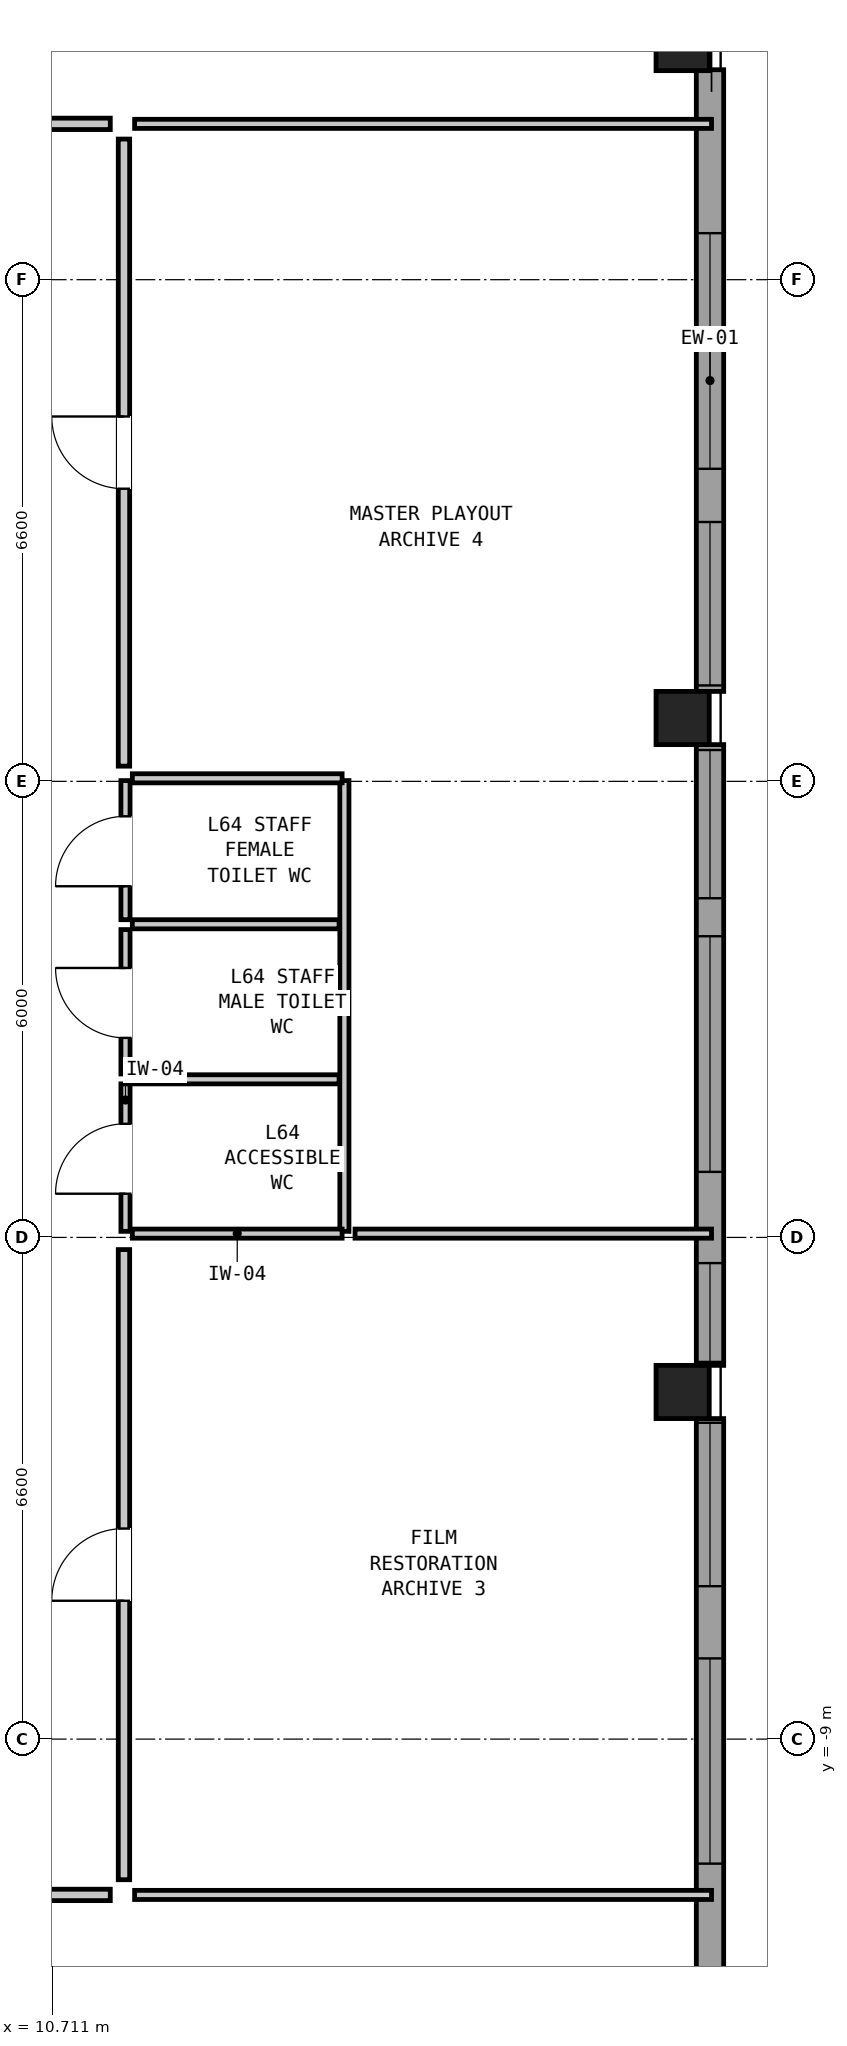
"""IFC4 building model, lengths in metres.
Left out: names, types, materials, properties, quantities, classifications, styles, units other than length and angle.
Written with IfcOpenShell. Run it as: python <this file> out.ifc"""

import sys

from ifc_helpers import new_model, si_unit, direction, frame, frame_2d, origin, origin_2d, place, context, subcontext, project, spatial, rectangle, hollow_rectangle, extrude, element, fill, save


model = new_model("IFC4")
c1 = context("Model", 3, precision=1e-05, world=origin(), true_north=direction((0.0, 1.0)))
c2 = subcontext(c1, "Body", "Model", "MODEL_VIEW")
j1 = project(units=[si_unit("LENGTHUNIT", "METRE"), si_unit("PLANEANGLEUNIT", "RADIAN")], contexts=[c1])
p1 = place(None, origin())
s1 = spatial("IfcSite", under=j1, at=p1, CompositionType="ELEMENT")
p2 = place(p1, origin())
s2 = spatial("IfcBuilding", under=s1, at=p2, CompositionType="ELEMENT")
p3 = place(p2, frame((0.0, 0.0, 217.8)))
s3 = spatial("IfcBuildingStorey", under=s2, at=p3, CompositionType="ELEMENT", Elevation=217.8)
for number, where, z_axis, x_axis in (
    (1, (19.0, -4.433, 0.0), (0.0, 0.0, 1.0), (0.0, 1.0, 0.0)),
    (2, (19.0, 4.433, 0.0), (0.0, 0.0, 1.0), (0.0, 1.0, 0.0)),
    (3, (19.0, 13.3, 0.0), (0.0, 0.0, 1.0), (0.0, 1.0, 0.0)),
):
    element("IfcColumn", number, at=place(p3, frame(where, z_axis=z_axis, x_axis=x_axis)), inside=s3, PredefinedType="COLUMN", context=c2, shape_type="SweptSolid", body=[
        extrude(hollow_rectangle(XDim=0.7, YDim=0.7, WallThickness=0.045, at=origin_2d()), origin(), (0.0, 0.0, 1.0), 3.05),
    ])
p4 = place(p3, frame((19.36, 12.962, 0.0), z_axis=(0.0, 0.0, 1.0), x_axis=(0.0, -1.0, 0.0)))
e4 = element("IfcWall", 4, at=p4, inside=s3, PredefinedType="SOLIDWALL", context=c2, shape_type="SweptSolid", body=[
    extrude(rectangle(XDim=8.179, YDim=0.36, at=frame_2d((4.089, 0.0))), origin(), (0.0, 0.0, 1.0), 2.374),
])
p5 = place(p4, frame((2.15, 0.0, 1.4)))
e5 = element("IfcOpeningElement", 5, at=p5, cuts=e4, PredefinedType="OPENING", context=c2, shape_type="SweptSolid", body=[
    extrude(rectangle(XDim=3.1, YDim=0.8, at=frame_2d((1.55, 0.4))), frame((0.0, 0.192, 0.0), z_axis=(0.0, -1.0, 0.0), x_axis=(1.0, 0.0, 0.0)), (0.0, 0.0, 1.0), 0.384),
])
p6 = place(p4, frame((5.95, 0.0, 0.2)))
e6 = element("IfcOpeningElement", 6, at=p6, cuts=e4, PredefinedType="OPENING", context=c2, shape_type="SweptSolid", body=[
    extrude(rectangle(XDim=2.15, YDim=1.05, at=frame_2d((1.075, 0.525))), frame((0.0, 0.192, 0.0), z_axis=(0.0, -1.0, 0.0), x_axis=(1.0, 0.0, 0.0)), (0.0, 0.0, 1.0), 0.384),
])
p7 = place(p3, frame((19.36, 4.083, 0.0), z_axis=(0.0, 0.0, 1.0), x_axis=(0.0, -1.0, 0.0)))
e7 = element("IfcWall", 7, at=p7, inside=s3, PredefinedType="SOLIDWALL", context=c2, shape_type="SweptSolid", body=[
    extrude(rectangle(XDim=8.167, YDim=0.36, at=frame_2d((4.083, 0.0))), origin(), (0.0, 0.0, 1.0), 2.374),
])
p8 = place(p7, frame((0.071, 0.0, 0.2)))
e8 = element("IfcOpeningElement", 8, at=p8, cuts=e7, PredefinedType="OPENING", context=c2, shape_type="SweptSolid", body=[
    extrude(rectangle(XDim=1.95, YDim=0.95, at=frame_2d((0.975, 0.475))), frame((0.0, 0.192, 0.0), z_axis=(0.0, -1.0, 0.0), x_axis=(1.0, 0.0, 0.0)), (0.0, 0.0, 1.0), 0.384),
])
p9 = place(p7, frame((2.521, 0.0, 1.4)))
e9 = element("IfcOpeningElement", 9, at=p9, cuts=e7, PredefinedType="OPENING", context=c2, shape_type="SweptSolid", body=[
    extrude(rectangle(XDim=3.1, YDim=0.8, at=frame_2d((1.55, 0.4))), frame((0.0, 0.192, 0.0), z_axis=(0.0, -1.0, 0.0), x_axis=(1.0, 0.0, 0.0)), (0.0, 0.0, 1.0), 0.384),
])
p10 = place(p7, frame((6.821, 0.0, 0.2)))
e10 = element("IfcOpeningElement", 10, at=p10, cuts=e7, PredefinedType="OPENING", context=c2, shape_type="SweptSolid", body=[
    extrude(rectangle(XDim=1.3, YDim=1.3, at=frame_2d((0.65, 0.65))), frame((0.0, 0.192, 0.0), z_axis=(0.0, -1.0, 0.0), x_axis=(1.0, 0.0, 0.0)), (0.0, 0.0, 1.0), 0.384),
])
p11 = place(p3, frame((19.36, -4.783, 0.0), z_axis=(0.0, 0.0, 1.0), x_axis=(0.0, -1.0, 0.0)))
e11 = element("IfcWall", 11, at=p11, inside=s3, PredefinedType="SOLIDWALL", context=c2, shape_type="SweptSolid", body=[
    extrude(rectangle(XDim=8.179, YDim=0.36, at=frame_2d((4.089, 0.0))), origin(), (0.0, 0.0, 1.0), 2.374),
])
p12 = place(p11, frame((0.055, 0.0, 0.2)))
e12 = element("IfcOpeningElement", 12, at=p12, cuts=e11, PredefinedType="OPENING", context=c2, shape_type="SweptSolid", body=[
    extrude(rectangle(XDim=2.15, YDim=1.05, at=frame_2d((1.075, 0.525))), frame((0.0, 0.192, 0.0), z_axis=(0.0, -1.0, 0.0), x_axis=(1.0, 0.0, 0.0)), (0.0, 0.0, 1.0), 0.384),
])
p13 = place(p11, frame((3.155, 0.0, 1.3)))
e13 = element("IfcOpeningElement", 13, at=p13, cuts=e11, PredefinedType="OPENING", context=c2, shape_type="SweptSolid", body=[
    extrude(rectangle(XDim=2.7, YDim=0.9, at=frame_2d((1.35, 0.45))), frame((0.0, 0.192, 0.0), z_axis=(0.0, -1.0, 0.0), x_axis=(1.0, 0.0, 0.0)), (0.0, 0.0, 1.0), 0.384),
])
p14 = place(p3, frame((11.67, -2.32, 0.0), z_axis=(0.0, 0.0, 1.0), x_axis=(0.0, 1.0, 0.0)))
e14 = element("IfcWall", 14, at=p14, inside=s3, PredefinedType="PARTITIONING", context=c2, shape_type="SweptSolid", body=[
    extrude(rectangle(XDim=1.94, YDim=0.12, at=frame_2d((0.97, 0.0))), origin(), (0.0, 0.0, 1.0), 2.86),
])
p15 = place(p14, frame((0.495, 0.0, 0.0)))
e15 = element("IfcOpeningElement", 15, at=p15, cuts=e14, PredefinedType="OPENING", context=c2, shape_type="SweptSolid", body=[
    extrude(rectangle(XDim=0.92, YDim=2.1, at=frame_2d((0.46, 1.05))), frame((0.0, 0.072, 0.0), z_axis=(0.0, -1.0, 0.0), x_axis=(1.0, 0.0, 0.0)), (0.0, 0.0, 1.0), 0.144),
])
p16 = place(p3, frame((11.67, -0.25, 0.0), z_axis=(0.0, 0.0, 1.0), x_axis=(0.0, 1.0, 0.0)))
e16 = element("IfcWall", 16, at=p16, inside=s3, PredefinedType="PARTITIONING", context=c2, shape_type="SweptSolid", body=[
    extrude(rectangle(XDim=1.9, YDim=0.12, at=frame_2d((0.95, 0.0))), origin(), (0.0, 0.0, 1.0), 2.86),
])
p17 = place(p16, frame((0.475, 0.0, 0.0)))
e17 = element("IfcOpeningElement", 17, at=p17, cuts=e16, PredefinedType="OPENING", context=c2, shape_type="SweptSolid", body=[
    extrude(rectangle(XDim=0.92, YDim=2.1, at=frame_2d((0.46, 1.05))), frame((0.0, 0.072, 0.0), z_axis=(0.0, -1.0, 0.0), x_axis=(1.0, 0.0, 0.0)), (0.0, 0.0, 1.0), 0.144),
])
p18 = place(p3, frame((11.67, 1.78, 0.0), z_axis=(0.0, 0.0, 1.0), x_axis=(0.0, 1.0, 0.0)))
e18 = element("IfcWall", 18, at=p18, inside=s3, PredefinedType="PARTITIONING", context=c2, shape_type="SweptSolid", body=[
    extrude(rectangle(XDim=1.83, YDim=0.12, at=frame_2d((0.915, 0.0))), origin(), (0.0, 0.0, 1.0), 2.86),
])
p19 = place(p18, frame((0.44, 0.0, 0.0)))
e19 = element("IfcOpeningElement", 19, at=p19, cuts=e18, PredefinedType="OPENING", context=c2, shape_type="SweptSolid", body=[
    extrude(rectangle(XDim=0.92, YDim=2.1, at=frame_2d((0.46, 1.05))), frame((0.0, 0.072, 0.0), z_axis=(0.0, -1.0, 0.0), x_axis=(1.0, 0.0, 0.0)), (0.0, 0.0, 1.0), 0.144),
])
p20 = place(p3, frame((14.55, -2.32, 0.0), z_axis=(0.0, 0.0, 1.0), x_axis=(0.0, 1.0, 0.0)))
e20 = element("IfcWall", 20, at=p20, inside=s3, PredefinedType="PARTITIONING", context=c2, shape_type="SweptSolid", body=[
    extrude(rectangle(XDim=5.93, YDim=0.12, at=frame_2d((2.965, 0.0))), origin(), (0.0, 0.0, 1.0), 2.86),
])
for number, where, z_axis, x_axis in (
    (21, (11.76, -2.35, 0.0), (0.0, 0.0, 1.0), (1.0, 0.0, 0.0)),
    (22, (11.76, 3.64, 0.0), (0.0, 0.0, 1.0), (1.0, 0.0, 0.0)),
):
    element("IfcWall", number, at=place(p3, frame(where, z_axis=z_axis, x_axis=x_axis)), inside=s3, PredefinedType="PARTITIONING", context=c2, shape_type="SweptSolid", body=[
        extrude(rectangle(XDim=2.76, YDim=0.12, at=frame_2d((1.38, 0.0))), origin(), (0.0, 0.0, 1.0), 1.981),
    ])
for number, where, z_axis, x_axis in (
    (23, (11.76, -0.32, 0.0), (0.0, 0.0, 1.0), (1.0, 0.0, 0.0)),
    (24, (11.76, 1.72, 0.0), (0.0, 0.0, 1.0), (1.0, 0.0, 0.0)),
):
    element("IfcWall", number, at=place(p3, frame(where, z_axis=z_axis, x_axis=x_axis)), inside=s3, PredefinedType="PARTITIONING", context=c2, shape_type="SweptSolid", body=[
        extrude(rectangle(XDim=2.72, YDim=0.12, at=frame_2d((1.36, 0.0))), origin(), (0.0, 0.0, 1.0), 2.86),
    ])
for number, where, z_axis, x_axis in (
    (25, (11.79, 12.25, 0.0), (0.0, 0.0, 1.0), (1.0, 0.0, 0.0)),
    (26, (11.79, -11.05, 0.0), (0.0, 0.0, 1.0), (1.0, 0.0, 0.0)),
):
    element("IfcWall", number, at=place(p3, frame(where, z_axis=z_axis, x_axis=x_axis)), inside=s3, PredefinedType="PARTITIONING", context=c2, shape_type="SweptSolid", body=[
        extrude(rectangle(XDim=7.59, YDim=0.12, at=frame_2d((3.795, 0.0))), origin(), (0.0, 0.0, 1.0), 2.86),
    ])
p21 = place(p3, frame((14.69, -2.35, 0.0), z_axis=(0.0, 0.0, 1.0), x_axis=(1.0, 0.0, 0.0)))
e27 = element("IfcWall", 27, at=p21, inside=s3, PredefinedType="PARTITIONING", context=c2, shape_type="SweptSolid", body=[
    extrude(rectangle(XDim=4.69, YDim=0.12, at=frame_2d((2.345, 0.0))), origin(), (0.0, 0.0, 1.0), 1.981),
])
p22 = place(p3, frame((6.68, 12.25, 0.0), z_axis=(0.0, 0.0, 1.0), x_axis=(1.0, 0.0, 0.0)))
e28 = element("IfcWall", 28, at=p22, inside=s3, PredefinedType="PARTITIONING", context=c2, shape_type="SweptSolid", body=[
    extrude(rectangle(XDim=4.79, YDim=0.15, at=frame_2d((2.395, 0.0))), origin(), (0.0, 0.0, 1.0), 2.86),
])
p23 = place(p22, frame((1.32, 0.0, 0.0)))
e29 = element("IfcOpeningElement", 29, at=p23, cuts=e28, PredefinedType="OPENING", context=c2, shape_type="SweptSolid", body=[
    extrude(rectangle(XDim=0.95, YDim=2.1, at=frame_2d((0.475, 1.05))), frame((0.0, 0.087, 0.0), z_axis=(0.0, -1.0, 0.0), x_axis=(1.0, 0.0, 0.0)), (0.0, 0.0, 1.0), 0.174),
])
p24 = place(p3, frame((7.68, -11.05, 0.0), z_axis=(0.0, 0.0, 1.0), x_axis=(1.0, 0.0, 0.0)))
e30 = element("IfcWall", 30, at=p24, inside=s3, PredefinedType="PARTITIONING", context=c2, shape_type="SweptSolid", body=[
    extrude(rectangle(XDim=3.79, YDim=0.15, at=frame_2d((1.895, 0.0))), origin(), (0.0, 0.0, 1.0), 2.86),
])
p25 = place(p24, frame((2.02, 0.0, 0.0)))
e31 = element("IfcOpeningElement", 31, at=p25, cuts=e30, PredefinedType="OPENING", context=c2, shape_type="SweptSolid", body=[
    extrude(rectangle(XDim=0.95, YDim=2.1, at=frame_2d((0.475, 1.05))), frame((0.0, 0.087, 0.0), z_axis=(0.0, -1.0, 0.0), x_axis=(1.0, 0.0, 0.0)), (0.0, 0.0, 1.0), 0.174),
])
p26 = place(p3, frame((11.65, -10.85, 0.0), z_axis=(0.0, 0.0, 1.0), x_axis=(0.0, 1.0, 0.0)))
e32 = element("IfcWall", 32, at=p26, inside=s3, PredefinedType="PARTITIONING", context=c2, shape_type="SweptSolid", body=[
    extrude(rectangle(XDim=8.29, YDim=0.15, at=frame_2d((4.145, 0.0))), origin(), (0.0, 0.0, 1.0), 2.86),
])
p27 = place(p26, frame((3.67, 0.0, 0.0)))
e33 = element("IfcOpeningElement", 33, at=p27, cuts=e32, PredefinedType="OPENING", context=c2, shape_type="SweptSolid", body=[
    extrude(rectangle(XDim=0.95, YDim=2.1, at=frame_2d((0.475, 1.05))), frame((0.0, 0.087, 0.0), z_axis=(0.0, -1.0, 0.0), x_axis=(1.0, 0.0, 0.0)), (0.0, 0.0, 1.0), 0.174),
])
p28 = place(p3, frame((11.65, 3.8, 0.0), z_axis=(0.0, 0.0, 1.0), x_axis=(0.0, 1.0, 0.0)))
e34 = element("IfcWall", 34, at=p28, inside=s3, PredefinedType="PARTITIONING", context=c2, shape_type="SweptSolid", body=[
    extrude(rectangle(XDim=8.25, YDim=0.15, at=frame_2d((4.125, 0.0))), origin(), (0.0, 0.0, 1.0), 2.86),
])
p29 = place(p28, frame((3.65, 0.0, 0.0)))
e35 = element("IfcOpeningElement", 35, at=p29, cuts=e34, PredefinedType="OPENING", context=c2, shape_type="SweptSolid", body=[
    extrude(rectangle(XDim=0.95, YDim=2.1, at=frame_2d((0.475, 1.05))), frame((0.0, 0.087, 0.0), z_axis=(0.0, -1.0, 0.0), x_axis=(1.0, 0.0, 0.0)), (0.0, 0.0, 1.0), 0.174),
])
p30 = place(p5, origin())
e36 = element("IfcWindow", 36, at=p30, inside=s3, PartitioningType="SINGLE_PANEL", PredefinedType="WINDOW", context=c2, shape_type="SweptSolid", body=[
    extrude(rectangle(XDim=3.1, YDim=0.8, at=frame_2d((1.55, 0.4))), frame((0.0, 0.03, 0.0), z_axis=(0.0, -1.0, 0.0), x_axis=(1.0, 0.0, 0.0)), (0.0, 0.0, 1.0), 0.06),
])
fill(e5, e36)
p31 = place(p6, origin())
e37 = element("IfcWindow", 37, at=p31, inside=s3, PartitioningType="SINGLE_PANEL", PredefinedType="WINDOW", context=c2, shape_type="SweptSolid", body=[
    extrude(rectangle(XDim=2.15, YDim=1.05, at=frame_2d((1.075, 0.525))), frame((0.0, 0.03, 0.0), z_axis=(0.0, -1.0, 0.0), x_axis=(1.0, 0.0, 0.0)), (0.0, 0.0, 1.0), 0.06),
])
fill(e6, e37)
p32 = place(p8, origin())
e38 = element("IfcWindow", 38, at=p32, inside=s3, PartitioningType="SINGLE_PANEL", PredefinedType="WINDOW", context=c2, shape_type="SweptSolid", body=[
    extrude(rectangle(XDim=1.95, YDim=0.95, at=frame_2d((0.975, 0.475))), frame((0.0, 0.03, 0.0), z_axis=(0.0, -1.0, 0.0), x_axis=(1.0, 0.0, 0.0)), (0.0, 0.0, 1.0), 0.06),
])
fill(e8, e38)
p33 = place(p9, origin())
e39 = element("IfcWindow", 39, at=p33, inside=s3, PartitioningType="SINGLE_PANEL", PredefinedType="WINDOW", context=c2, shape_type="SweptSolid", body=[
    extrude(rectangle(XDim=3.1, YDim=0.8, at=frame_2d((1.55, 0.4))), frame((0.0, 0.03, 0.0), z_axis=(0.0, -1.0, 0.0), x_axis=(1.0, 0.0, 0.0)), (0.0, 0.0, 1.0), 0.06),
])
fill(e9, e39)
p34 = place(p10, origin())
e40 = element("IfcWindow", 40, at=p34, inside=s3, PartitioningType="SINGLE_PANEL", PredefinedType="WINDOW", context=c2, shape_type="SweptSolid", body=[
    extrude(rectangle(XDim=1.3, YDim=1.3, at=frame_2d((0.65, 0.65))), frame((0.0, 0.03, 0.0), z_axis=(0.0, -1.0, 0.0), x_axis=(1.0, 0.0, 0.0)), (0.0, 0.0, 1.0), 0.06),
])
fill(e10, e40)
p35 = place(p12, origin())
e41 = element("IfcWindow", 41, at=p35, inside=s3, PartitioningType="SINGLE_PANEL", PredefinedType="WINDOW", context=c2, shape_type="SweptSolid", body=[
    extrude(rectangle(XDim=2.15, YDim=1.05, at=frame_2d((1.075, 0.525))), frame((0.0, 0.03, 0.0), z_axis=(0.0, -1.0, 0.0), x_axis=(1.0, 0.0, 0.0)), (0.0, 0.0, 1.0), 0.06),
])
fill(e12, e41)
p36 = place(p13, origin())
e42 = element("IfcWindow", 42, at=p36, inside=s3, PartitioningType="SINGLE_PANEL", PredefinedType="WINDOW", context=c2, shape_type="SweptSolid", body=[
    extrude(rectangle(XDim=2.7, YDim=0.9, at=frame_2d((1.35, 0.45))), frame((0.0, 0.03, 0.0), z_axis=(0.0, -1.0, 0.0), x_axis=(1.0, 0.0, 0.0)), (0.0, 0.0, 1.0), 0.06),
])
fill(e13, e42)
p37 = place(p15, origin())
e43 = element("IfcDoor", 43, at=p37, inside=s3, OperationType="SINGLE_SWING_LEFT", PredefinedType="DOOR", context=c2, shape_type="SweptSolid", body=[
    extrude(rectangle(XDim=0.92, YDim=2.1, at=frame_2d((0.46, 1.05))), frame((0.0, 0.025, 0.0), z_axis=(0.0, -1.0, 0.0), x_axis=(1.0, 0.0, 0.0)), (0.0, 0.0, 1.0), 0.05),
])
fill(e15, e43)
p38 = place(p17, origin())
e44 = element("IfcDoor", 44, at=p38, inside=s3, OperationType="SINGLE_SWING_RIGHT", PredefinedType="DOOR", context=c2, shape_type="SweptSolid", body=[
    extrude(rectangle(XDim=0.92, YDim=2.1, at=frame_2d((0.46, 1.05))), frame((0.0, 0.025, 0.0), z_axis=(0.0, -1.0, 0.0), x_axis=(1.0, 0.0, 0.0)), (0.0, 0.0, 1.0), 0.05),
])
fill(e17, e44)
p39 = place(p19, origin())
e45 = element("IfcDoor", 45, at=p39, inside=s3, OperationType="SINGLE_SWING_LEFT", PredefinedType="DOOR", context=c2, shape_type="SweptSolid", body=[
    extrude(rectangle(XDim=0.92, YDim=2.1, at=frame_2d((0.46, 1.05))), frame((0.0, 0.025, 0.0), z_axis=(0.0, -1.0, 0.0), x_axis=(1.0, 0.0, 0.0)), (0.0, 0.0, 1.0), 0.05),
])
fill(e19, e45)
p40 = place(p27, origin())
e46 = element("IfcDoor", 46, at=p40, inside=s3, OperationType="SINGLE_SWING_LEFT", PredefinedType="DOOR", context=c2, shape_type="SweptSolid", body=[
    extrude(rectangle(XDim=0.95, YDim=2.1, at=frame_2d((0.475, 1.05))), frame((0.0, 0.025, 0.0), z_axis=(0.0, -1.0, 0.0), x_axis=(1.0, 0.0, 0.0)), (0.0, 0.0, 1.0), 0.05),
])
fill(e33, e46)
p41 = place(p29, origin())
e47 = element("IfcDoor", 47, at=p41, inside=s3, OperationType="SINGLE_SWING_RIGHT", PredefinedType="DOOR", context=c2, shape_type="SweptSolid", body=[
    extrude(rectangle(XDim=0.95, YDim=2.1, at=frame_2d((0.475, 1.05))), frame((0.0, 0.025, 0.0), z_axis=(0.0, -1.0, 0.0), x_axis=(1.0, 0.0, 0.0)), (0.0, 0.0, 1.0), 0.05),
])
fill(e35, e47)
save(model, sys.argv[1])
